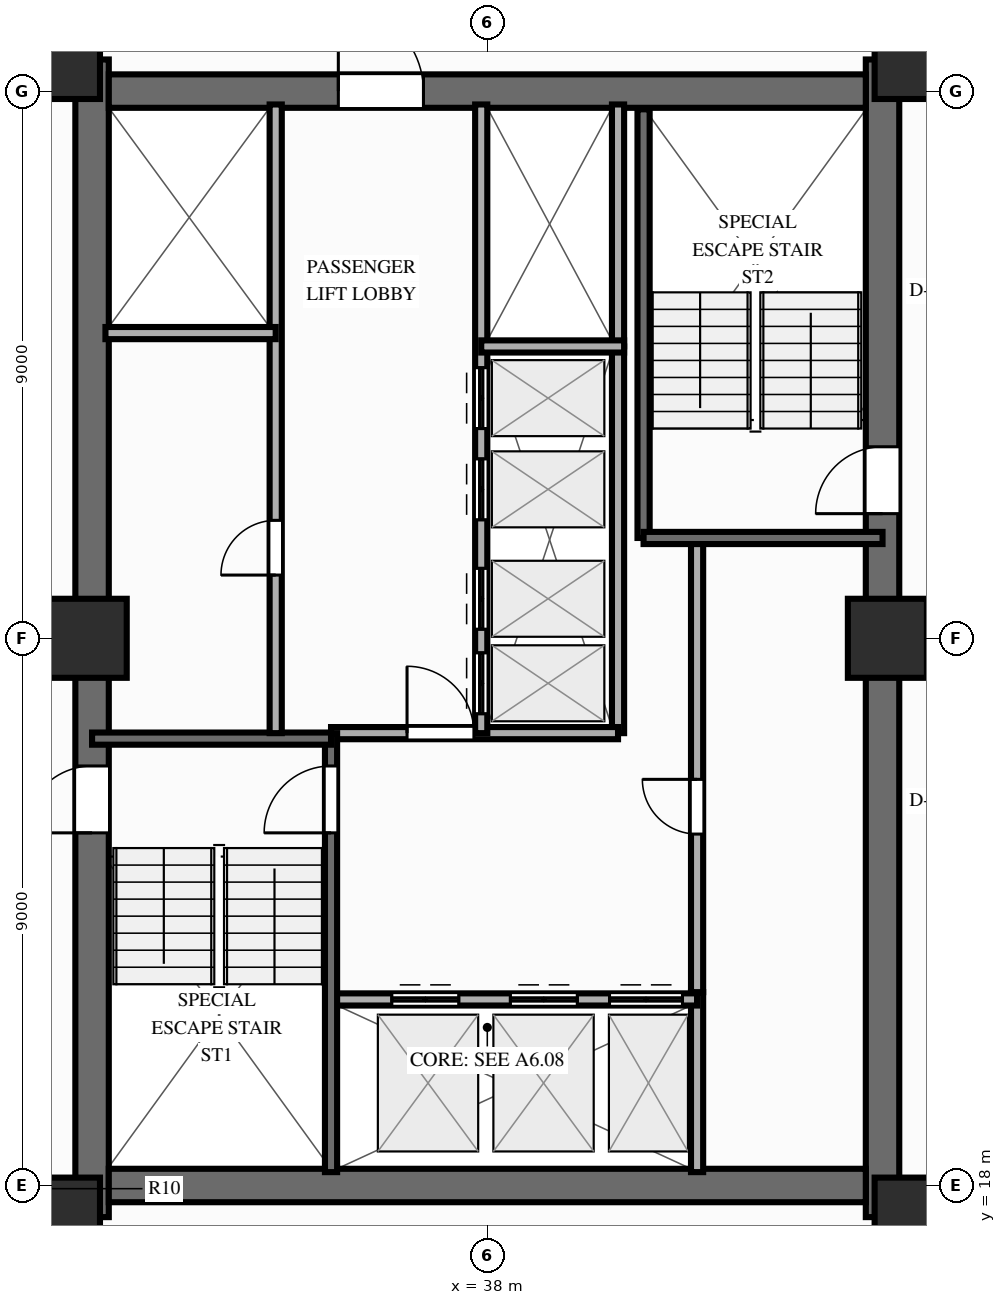
"""IFC4 building model, lengths in metres.
Left out: names, types, materials, properties, quantities, classifications, styles, units other than length and angle.
Written with IfcOpenShell. Run it as: python <this file> out.ifc"""

import sys

from ifc_helpers import new_model, si_unit, direction, frame, frame_2d, origin, origin_2d, place, context, subcontext, project, spatial, rectangle, extrude, source, transform, mapped, element, fill, save


model = new_model("IFC4")
c1 = context("Model", 3, precision=1e-05, world=origin(), true_north=direction((0.0, 1.0)))
c2 = subcontext(c1, "Body", "Model", "MODEL_VIEW")
j1 = project(units=[si_unit("LENGTHUNIT", "METRE"), si_unit("PLANEANGLEUNIT", "RADIAN")], contexts=[c1])
p1 = place(None, origin())
s1 = spatial("IfcSite", under=j1, at=p1, CompositionType="ELEMENT")
p2 = place(p1, origin())
s2 = spatial("IfcBuilding", under=s1, at=p2, CompositionType="ELEMENT")
p3 = place(p2, frame((0.0, 0.0, 113.85)))
s3 = spatial("IfcBuildingStorey", under=s2, at=p3, CompositionType="ELEMENT", Elevation=113.85)
p4 = place(p3, frame((31.5, 17.48, 0.0), z_axis=(0.0, 0.0, 1.0), x_axis=(0.0, 1.0, 0.0)))
e1 = element("IfcWall", 1, at=p4, inside=s3, PredefinedType="SHEAR", context=c2, shape_type="SweptSolid", body=[
    extrude(rectangle(XDim=19.04, YDim=0.55, at=frame_2d((9.52, 0.0))), origin(), (0.0, 0.0, 1.0), 3.0),
])
p5 = place(p4, frame((6.32, 0.0, 0.0)))
e2 = element("IfcOpeningElement", 2, at=p5, cuts=e1, PredefinedType="OPENING", context=c2, shape_type="SweptSolid", body=[
    extrude(rectangle(XDim=1.1, YDim=2.15, at=frame_2d((0.55, 1.075))), frame((0.0, 0.287, 0.0), z_axis=(0.0, -1.0, 0.0), x_axis=(1.0, 0.0, 0.0)), (0.0, 0.0, 1.0), 0.574),
])
p6 = place(p3, frame((44.5, 17.48, 0.0), z_axis=(0.0, 0.0, 1.0), x_axis=(0.0, 1.0, 0.0)))
e3 = element("IfcWall", 3, at=p6, inside=s3, PredefinedType="SHEAR", context=c2, shape_type="SweptSolid", body=[
    extrude(rectangle(XDim=19.04, YDim=0.55, at=frame_2d((9.52, 0.0))), origin(), (0.0, 0.0, 1.0), 3.0),
])
p7 = place(p6, frame((12.67, 0.0, 0.0), z_axis=(0.0, 0.0, 1.0), x_axis=(-1.0, 0.0, 0.0)))
e4 = element("IfcOpeningElement", 4, at=p7, cuts=e3, PredefinedType="OPENING", context=c2, shape_type="SweptSolid", body=[
    extrude(rectangle(XDim=1.1, YDim=2.15, at=frame_2d((0.55, 1.075))), frame((0.0, 0.287, 0.0), z_axis=(0.0, -1.0, 0.0), x_axis=(1.0, 0.0, 0.0)), (0.0, 0.0, 1.0), 0.574),
])
p8 = place(p3, frame((31.775, 18.0, 0.0), z_axis=(0.0, 0.0, 1.0), x_axis=(1.0, 0.0, 0.0)))
e5 = element("IfcWall", 5, at=p8, inside=s3, PredefinedType="SHEAR", context=c2, shape_type="SweptSolid", body=[
    extrude(rectangle(XDim=12.45, YDim=0.55, at=frame_2d((6.225, 0.0))), origin(), (0.0, 0.0, 1.0), 3.0),
])
p9 = place(p3, frame((31.775, 36.0, 0.0), z_axis=(0.0, 0.0, 1.0), x_axis=(1.0, 0.0, 0.0)))
e6 = element("IfcWall", 6, at=p9, inside=s3, PredefinedType="SHEAR", context=c2, shape_type="SweptSolid", body=[
    extrude(rectangle(XDim=12.45, YDim=0.55, at=frame_2d((6.225, 0.0))), origin(), (0.0, 0.0, 1.0), 3.0),
])
p10 = place(p9, frame((5.175, 0.0, 0.0), z_axis=(0.0, 0.0, 1.0), x_axis=(-1.0, 0.0, 0.0)))
e7 = element("IfcOpeningElement", 7, at=p10, cuts=e6, PredefinedType="OPENING", context=c2, shape_type="SweptSolid", body=[
    extrude(rectangle(XDim=1.4, YDim=2.15, at=frame_2d((0.7, 1.075))), frame((0.0, 0.287, 0.0), z_axis=(0.0, -1.0, 0.0), x_axis=(1.0, 0.0, 0.0)), (0.0, 0.0, 1.0), 0.574),
])
m1 = source(origin(), c2, "Body", "SweptSolid", [
    extrude(rectangle(XDim=1.3, YDim=1.3, at=origin_2d()), origin(), (0.0, 0.0, 1.0), 3.0),
])
for number, where, z_axis, x_axis in (
    (8, (30.98, 17.48, 0.0), (0.0, 0.0, 1.0), (1.0, 0.0, 0.0)),
    (9, (45.02, 17.48, 0.0), (0.0, 0.0, 1.0), (1.0, 0.0, 0.0)),
    (10, (30.98, 36.52, 0.0), (0.0, 0.0, 1.0), (1.0, 0.0, 0.0)),
    (11, (45.02, 36.52, 0.0), (0.0, 0.0, 1.0), (1.0, 0.0, 0.0)),
    (12, (31.42, 27.0, 0.0), (0.0, 0.0, 1.0), (1.0, 0.0, 0.0)),
    (13, (44.58, 27.0, 0.0), (0.0, 0.0, 1.0), (1.0, 0.0, 0.0)),
):
    element("IfcColumn", number, at=place(p3, frame(where, z_axis=z_axis, x_axis=x_axis)), inside=s3, PredefinedType="COLUMN", context=c2, shape_type="MappedRepresentation", body=[
        mapped(m1, transform((0.0, 0.0, 0.0), scale=1.0)),
    ])
p11 = place(p3, frame((41.45, 18.22, 0.0), z_axis=(0.0, 0.0, 1.0), x_axis=(0.0, 1.0, 0.0)))
e14 = element("IfcWall", 14, at=p11, inside=s3, PredefinedType="PARTITIONING", context=c2, shape_type="SweptSolid", body=[
    extrude(rectangle(XDim=2.96, YDim=0.2, at=frame_2d((1.48, 0.0))), origin(), (0.0, 0.0, 1.0), 2.79),
])
p12 = place(p3, frame((41.45, 21.18, 0.0), z_axis=(0.0, 0.0, 1.0), x_axis=(0.0, 1.0, 0.0)))
e15 = element("IfcWall", 15, at=p12, inside=s3, PredefinedType="PARTITIONING", context=c2, shape_type="SweptSolid", body=[
    extrude(rectangle(XDim=7.42, YDim=0.2, at=frame_2d((3.71, 0.0))), origin(), (0.0, 0.0, 1.0), 2.79),
])
p13 = place(p12, frame((2.6, 0.0, 0.0)))
e16 = element("IfcOpeningElement", 16, at=p13, cuts=e15, PredefinedType="OPENING", context=c2, shape_type="SweptSolid", body=[
    extrude(rectangle(XDim=0.9, YDim=2.1, at=frame_2d((0.45, 1.05))), frame((0.0, 0.112, 0.0), z_axis=(0.0, -1.0, 0.0), x_axis=(1.0, 0.0, 0.0)), (0.0, 0.0, 1.0), 0.224),
])
p14 = place(p3, frame((40.15, 25.44, 0.0), z_axis=(0.0, 0.0, 1.0), x_axis=(0.0, 1.0, 0.0)))
e17 = element("IfcWall", 17, at=p14, inside=s3, PredefinedType="PARTITIONING", context=c2, shape_type="SweptSolid", body=[
    extrude(rectangle(XDim=6.36, YDim=0.2, at=frame_2d((3.18, 0.0))), origin(), (0.0, 0.0, 1.0), 2.79),
])
p15 = place(p3, frame((40.15, 31.8, 0.0), z_axis=(0.0, 0.0, 1.0), x_axis=(0.0, 1.0, 0.0)))
e18 = element("IfcWall", 18, at=p15, inside=s3, PredefinedType="PARTITIONING", context=c2, shape_type="SweptSolid", body=[
    extrude(rectangle(XDim=3.98, YDim=0.2, at=frame_2d((1.99, 0.0))), origin(), (0.0, 0.0, 1.0), 2.79),
])
p16 = place(p3, frame((35.43, 21.06, 0.0), z_axis=(0.0, 0.0, 1.0), x_axis=(1.0, 0.0, 0.0)))
e19 = element("IfcWall", 19, at=p16, inside=s3, PredefinedType="PARTITIONING", context=c2, shape_type="SweptSolid", body=[
    extrude(rectangle(XDim=6.02, YDim=0.2, at=frame_2d((3.01, 0.0))), origin(), (0.0, 0.0, 1.0), 2.79),
])
p17 = place(p16, frame((1.0, 0.0, 0.0)))
e20 = element("IfcOpeningElement", 20, at=p17, cuts=e19, PredefinedType="OPENING", context=c2, shape_type="SweptSolid", body=[
    extrude(rectangle(XDim=1.1, YDim=2.15, at=frame_2d((0.55, 1.075))), frame((0.0, 0.112, 0.0), z_axis=(0.0, -1.0, 0.0), x_axis=(1.0, 0.0, 0.0)), (0.0, 0.0, 1.0), 0.224),
])
p18 = place(p16, frame((2.95, 0.0, 0.0)))
e21 = element("IfcOpeningElement", 21, at=p18, cuts=e19, PredefinedType="OPENING", context=c2, shape_type="SweptSolid", body=[
    extrude(rectangle(XDim=1.1, YDim=2.15, at=frame_2d((0.55, 1.075))), frame((0.0, 0.112, 0.0), z_axis=(0.0, -1.0, 0.0), x_axis=(1.0, 0.0, 0.0)), (0.0, 0.0, 1.0), 0.224),
])
p19 = place(p16, frame((4.58, 0.0, 0.0)))
e22 = element("IfcOpeningElement", 22, at=p19, cuts=e19, PredefinedType="OPENING", context=c2, shape_type="SweptSolid", body=[
    extrude(rectangle(XDim=1.2, YDim=2.15, at=frame_2d((0.6, 1.075))), frame((0.0, 0.112, 0.0), z_axis=(0.0, -1.0, 0.0), x_axis=(1.0, 0.0, 0.0)), (0.0, 0.0, 1.0), 0.224),
])
p20 = place(p3, frame((35.43, 25.44, 0.0), z_axis=(0.0, 0.0, 1.0), x_axis=(1.0, 0.0, 0.0)))
e23 = element("IfcWall", 23, at=p20, inside=s3, PredefinedType="PARTITIONING", context=c2, shape_type="SweptSolid", body=[
    extrude(rectangle(XDim=4.72, YDim=0.2, at=frame_2d((2.36, 0.0))), origin(), (0.0, 0.0, 1.0), 2.79),
])
p21 = place(p20, frame((1.25, 0.0, 0.0)))
e24 = element("IfcOpeningElement", 24, at=p21, cuts=e23, PredefinedType="OPENING", context=c2, shape_type="SweptSolid", body=[
    extrude(rectangle(XDim=1.1, YDim=2.15, at=frame_2d((0.55, 1.075))), frame((0.0, 0.112, 0.0), z_axis=(0.0, -1.0, 0.0), x_axis=(1.0, 0.0, 0.0)), (0.0, 0.0, 1.0), 0.224),
])
p22 = place(p3, frame((35.43, 18.22, 0.0), z_axis=(0.0, 0.0, 1.0), x_axis=(0.0, 1.0, 0.0)))
e25 = element("IfcWall", 25, at=p22, inside=s3, PredefinedType="SOLIDWALL", context=c2, shape_type="SweptSolid", body=[
    extrude(rectangle(XDim=7.22, YDim=0.2, at=frame_2d((3.61, 0.0))), origin(), (0.0, 0.0, 1.0), 2.79),
])
p23 = place(p22, frame((6.68, 0.0, 0.0), z_axis=(0.0, 0.0, 1.0), x_axis=(-1.0, 0.0, 0.0)))
e26 = element("IfcOpeningElement", 26, at=p23, cuts=e25, PredefinedType="OPENING", context=c2, shape_type="SweptSolid", body=[
    extrude(rectangle(XDim=1.1, YDim=2.15, at=frame_2d((0.55, 1.075))), frame((0.0, 0.112, 0.0), z_axis=(0.0, -1.0, 0.0), x_axis=(1.0, 0.0, 0.0)), (0.0, 0.0, 1.0), 0.224),
])
p24 = place(p3, frame((31.5, 25.35, 0.0), z_axis=(0.0, 0.0, 1.0), x_axis=(1.0, 0.0, 0.0)))
e27 = element("IfcWall", 27, at=p24, inside=s3, PredefinedType="SOLIDWALL", context=c2, shape_type="SweptSolid", body=[
    extrude(rectangle(XDim=3.93, YDim=0.2, at=frame_2d((1.965, 0.0))), origin(), (0.0, 0.0, 1.0), 2.79),
])
p25 = place(p3, frame((40.57, 28.65, 0.0), z_axis=(0.0, 0.0, 1.0), x_axis=(0.0, 1.0, 0.0)))
e28 = element("IfcWall", 28, at=p25, inside=s3, PredefinedType="SOLIDWALL", context=c2, shape_type="SweptSolid", body=[
    extrude(rectangle(XDim=7.05, YDim=0.2, at=frame_2d((3.525, 0.0))), origin(), (0.0, 0.0, 1.0), 2.79),
])
p26 = place(p3, frame((40.57, 28.65, 0.0), z_axis=(0.0, 0.0, 1.0), x_axis=(1.0, 0.0, 0.0)))
e29 = element("IfcWall", 29, at=p26, inside=s3, PredefinedType="SOLIDWALL", context=c2, shape_type="SweptSolid", body=[
    extrude(rectangle(XDim=3.93, YDim=0.2, at=frame_2d((1.965, 0.0))), origin(), (0.0, 0.0, 1.0), 2.79),
])
p27 = place(p3, frame((34.52, 25.44, 0.0), z_axis=(0.0, 0.0, 1.0), x_axis=(0.0, 1.0, 0.0)))
e30 = element("IfcWall", 30, at=p27, inside=s3, PredefinedType="PARTITIONING", context=c2, shape_type="SweptSolid", body=[
    extrude(rectangle(XDim=10.34, YDim=0.2, at=frame_2d((5.17, 0.0))), origin(), (0.0, 0.0, 1.0), 2.79),
])
p28 = place(p27, frame((2.6, 0.0, 0.0)))
e31 = element("IfcOpeningElement", 31, at=p28, cuts=e30, PredefinedType="OPENING", context=c2, shape_type="SweptSolid", body=[
    extrude(rectangle(XDim=0.9, YDim=2.1, at=frame_2d((0.45, 1.05))), frame((0.0, 0.112, 0.0), z_axis=(0.0, -1.0, 0.0), x_axis=(1.0, 0.0, 0.0)), (0.0, 0.0, 1.0), 0.224),
])
p29 = place(p3, frame((31.72, 32.02, 0.0), z_axis=(0.0, 0.0, 1.0), x_axis=(1.0, 0.0, 0.0)))
e32 = element("IfcWall", 32, at=p29, inside=s3, PredefinedType="PARTITIONING", context=c2, shape_type="SweptSolid", body=[
    extrude(rectangle(XDim=2.8, YDim=0.2, at=frame_2d((1.4, 0.0))), origin(), (0.0, 0.0, 1.0), 2.79),
])
p30 = place(p3, frame((37.9, 25.44, 0.0), z_axis=(0.0, 0.0, 1.0), x_axis=(0.0, 1.0, 0.0)))
e33 = element("IfcWall", 33, at=p30, inside=s3, PredefinedType="PARTITIONING", context=c2, shape_type="SweptSolid", body=[
    extrude(rectangle(XDim=10.34, YDim=0.2, at=frame_2d((5.17, 0.0))), origin(), (0.0, 0.0, 1.0), 2.79),
])
p31 = place(p30, frame((0.32, 0.0, 0.0)))
e34 = element("IfcOpeningElement", 34, at=p31, cuts=e33, PredefinedType="OPENING", context=c2, shape_type="SweptSolid", body=[
    extrude(rectangle(XDim=1.0, YDim=2.15, at=frame_2d((0.5, 1.075))), frame((0.0, 0.112, 0.0), z_axis=(0.0, -1.0, 0.0), x_axis=(1.0, 0.0, 0.0)), (0.0, 0.0, 1.0), 0.224),
])
p32 = place(p30, frame((1.71, 0.0, 0.0)))
e35 = element("IfcOpeningElement", 35, at=p32, cuts=e33, PredefinedType="OPENING", context=c2, shape_type="SweptSolid", body=[
    extrude(rectangle(XDim=1.0, YDim=2.15, at=frame_2d((0.5, 1.075))), frame((0.0, 0.112, 0.0), z_axis=(0.0, -1.0, 0.0), x_axis=(1.0, 0.0, 0.0)), (0.0, 0.0, 1.0), 0.224),
])
p33 = place(p30, frame((3.51, 0.0, 0.0)))
e36 = element("IfcOpeningElement", 36, at=p33, cuts=e33, PredefinedType="OPENING", context=c2, shape_type="SweptSolid", body=[
    extrude(rectangle(XDim=1.0, YDim=2.15, at=frame_2d((0.5, 1.075))), frame((0.0, 0.112, 0.0), z_axis=(0.0, -1.0, 0.0), x_axis=(1.0, 0.0, 0.0)), (0.0, 0.0, 1.0), 0.224),
])
p34 = place(p30, frame((5.01, 0.0, 0.0)))
e37 = element("IfcOpeningElement", 37, at=p34, cuts=e33, PredefinedType="OPENING", context=c2, shape_type="SweptSolid", body=[
    extrude(rectangle(XDim=1.0, YDim=2.15, at=frame_2d((0.5, 1.075))), frame((0.0, 0.112, 0.0), z_axis=(0.0, -1.0, 0.0), x_axis=(1.0, 0.0, 0.0)), (0.0, 0.0, 1.0), 0.224),
])
p35 = place(p3, frame((37.9, 31.8, 0.0), z_axis=(0.0, 0.0, 1.0), x_axis=(1.0, 0.0, 0.0)))
e38 = element("IfcWall", 38, at=p35, inside=s3, PredefinedType="PARTITIONING", context=c2, shape_type="SweptSolid", body=[
    extrude(rectangle(XDim=2.35, YDim=0.2, at=frame_2d((1.175, 0.0))), origin(), (0.0, 0.0, 1.0), 2.79),
])
m2 = source(origin(), c2, "Body", "SweptSolid", [
    extrude(rectangle(XDim=1.1, YDim=2.15, at=frame_2d((0.55, 1.075))), frame((0.0, 0.025, 0.0), z_axis=(0.0, -1.0, 0.0), x_axis=(1.0, 0.0, 0.0)), (0.0, 0.0, 1.0), 0.05),
])
p36 = place(p5, origin())
e39 = element("IfcDoor", 39, at=p36, inside=s3, OperationType="SINGLE_SWING_LEFT", PredefinedType="DOOR", context=c2, shape_type="MappedRepresentation", body=[
    mapped(m2, transform((0.0, 0.0, 0.0), scale=1.0)),
])
fill(e2, e39)
p37 = place(p7, origin())
e40 = element("IfcDoor", 40, at=p37, inside=s3, OperationType="SINGLE_SWING_RIGHT", PredefinedType="DOOR", context=c2, shape_type="MappedRepresentation", body=[
    mapped(m2, transform((0.0, 0.0, 0.0), scale=1.0)),
])
fill(e4, e40)
m3 = source(origin(), c2, "Body", "SweptSolid", [
    extrude(rectangle(XDim=1.4, YDim=2.15, at=frame_2d((0.7, 1.075))), frame((0.0, 0.025, 0.0), z_axis=(0.0, -1.0, 0.0), x_axis=(1.0, 0.0, 0.0)), (0.0, 0.0, 1.0), 0.05),
])
p38 = place(p10, origin())
e41 = element("IfcDoor", 41, at=p38, inside=s3, OperationType="SINGLE_SWING_RIGHT", PredefinedType="DOOR", context=c2, shape_type="MappedRepresentation", body=[
    mapped(m3, transform((0.0, 0.0, 0.0), scale=1.0)),
])
fill(e7, e41)
m4 = source(origin(), c2, "Body", "SweptSolid", [
    extrude(rectangle(XDim=0.9, YDim=2.1, at=frame_2d((0.45, 1.05))), frame((0.0, 0.025, 0.0), z_axis=(0.0, -1.0, 0.0), x_axis=(1.0, 0.0, 0.0)), (0.0, 0.0, 1.0), 0.05),
])
p39 = place(p13, origin())
e42 = element("IfcDoor", 42, at=p39, inside=s3, OperationType="SINGLE_SWING_RIGHT", PredefinedType="DOOR", context=c2, shape_type="MappedRepresentation", body=[
    mapped(m4, transform((0.0, 0.0, 0.0), scale=1.0)),
])
fill(e16, e42)
p40 = place(p17, origin())
e43 = element("IfcDoor", 43, at=p40, inside=s3, OperationType="DOUBLE_DOOR_SLIDING", PredefinedType="DOOR", context=c2, shape_type="MappedRepresentation", body=[
    mapped(m2, transform((0.0, 0.0, 0.0), scale=1.0)),
])
fill(e20, e43)
p41 = place(p18, origin())
e44 = element("IfcDoor", 44, at=p41, inside=s3, OperationType="DOUBLE_DOOR_SLIDING", PredefinedType="DOOR", context=c2, shape_type="MappedRepresentation", body=[
    mapped(m2, transform((0.0, 0.0, 0.0), scale=1.0)),
])
fill(e21, e44)
m5 = source(origin(), c2, "Body", "SweptSolid", [
    extrude(rectangle(XDim=1.2, YDim=2.15, at=frame_2d((0.6, 1.075))), frame((0.0, 0.025, 0.0), z_axis=(0.0, -1.0, 0.0), x_axis=(1.0, 0.0, 0.0)), (0.0, 0.0, 1.0), 0.05),
])
p42 = place(p19, origin())
e45 = element("IfcDoor", 45, at=p42, inside=s3, OperationType="DOUBLE_DOOR_SLIDING", PredefinedType="DOOR", context=c2, shape_type="MappedRepresentation", body=[
    mapped(m5, transform((0.0, 0.0, 0.0), scale=1.0)),
])
fill(e22, e45)
p43 = place(p21, origin())
e46 = element("IfcDoor", 46, at=p43, inside=s3, OperationType="SINGLE_SWING_LEFT", PredefinedType="DOOR", context=c2, shape_type="MappedRepresentation", body=[
    mapped(m2, transform((0.0, 0.0, 0.0), scale=1.0)),
])
fill(e24, e46)
p44 = place(p23, origin())
e47 = element("IfcDoor", 47, at=p44, inside=s3, OperationType="SINGLE_SWING_RIGHT", PredefinedType="DOOR", context=c2, shape_type="MappedRepresentation", body=[
    mapped(m2, transform((0.0, 0.0, 0.0), scale=1.0)),
])
fill(e26, e47)
p45 = place(p28, origin())
e48 = element("IfcDoor", 48, at=p45, inside=s3, OperationType="SINGLE_SWING_LEFT", PredefinedType="DOOR", context=c2, shape_type="MappedRepresentation", body=[
    mapped(m4, transform((0.0, 0.0, 0.0), scale=1.0)),
])
fill(e31, e48)
m6 = source(origin(), c2, "Body", "SweptSolid", [
    extrude(rectangle(XDim=1.0, YDim=2.15, at=frame_2d((0.5, 1.075))), frame((0.0, 0.025, 0.0), z_axis=(0.0, -1.0, 0.0), x_axis=(1.0, 0.0, 0.0)), (0.0, 0.0, 1.0), 0.05),
])
p46 = place(p31, origin())
e49 = element("IfcDoor", 49, at=p46, inside=s3, OperationType="DOUBLE_DOOR_SLIDING", PredefinedType="DOOR", context=c2, shape_type="MappedRepresentation", body=[
    mapped(m6, transform((0.0, 0.0, 0.0), scale=1.0)),
])
fill(e34, e49)
p47 = place(p32, origin())
e50 = element("IfcDoor", 50, at=p47, inside=s3, OperationType="DOUBLE_DOOR_SLIDING", PredefinedType="DOOR", context=c2, shape_type="MappedRepresentation", body=[
    mapped(m6, transform((0.0, 0.0, 0.0), scale=1.0)),
])
fill(e35, e50)
p48 = place(p33, origin())
e51 = element("IfcDoor", 51, at=p48, inside=s3, OperationType="DOUBLE_DOOR_SLIDING", PredefinedType="DOOR", context=c2, shape_type="MappedRepresentation", body=[
    mapped(m6, transform((0.0, 0.0, 0.0), scale=1.0)),
])
fill(e36, e51)
p49 = place(p34, origin())
e52 = element("IfcDoor", 52, at=p49, inside=s3, OperationType="DOUBLE_DOOR_SLIDING", PredefinedType="DOOR", context=c2, shape_type="MappedRepresentation", body=[
    mapped(m6, transform((0.0, 0.0, 0.0), scale=1.0)),
])
fill(e37, e52)
save(model, sys.argv[1])
